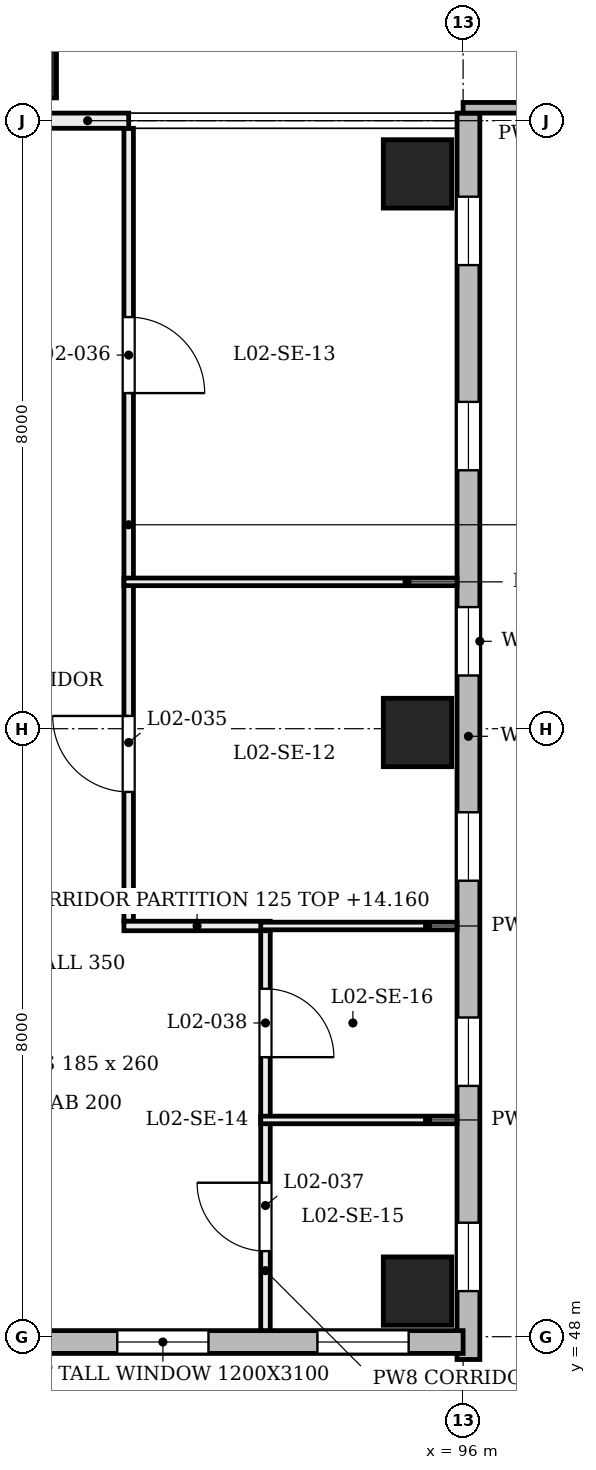
"""IFC4 building model, lengths in metres.
Left out: names, types, materials, properties, quantities, classifications, styles, units other than length and angle.
Written with IfcOpenShell. Run it as: python <this file> out.ifc"""

import sys

from ifc_helpers import new_model, si_unit, direction, frame, frame_2d, origin, origin_2d, place, context, subcontext, project, spatial, rectangle, extrude, element, fill, save


model = new_model("IFC4")
c1 = context("Model", 3, precision=1e-05, world=origin(), true_north=direction((0.0, 1.0)))
c2 = subcontext(c1, "Body", "Model", "MODEL_VIEW")
j1 = project(units=[si_unit("LENGTHUNIT", "METRE"), si_unit("PLANEANGLEUNIT", "RADIAN")], contexts=[c1])
p1 = place(None, origin())
s1 = spatial("IfcSite", under=j1, at=p1, CompositionType="ELEMENT")
p2 = place(p1, origin())
s2 = spatial("IfcBuilding", under=s1, at=p2, CompositionType="ELEMENT")
p3 = place(p2, frame((0.0, 0.0, 9.6)))
s3 = spatial("IfcBuildingStorey", under=s2, at=p3, CompositionType="ELEMENT", Elevation=9.6)
for number, where, z_axis, x_axis in (
    (1, (95.4, 48.6, 0.0), (0.0, 0.0, 1.0), (1.0, 0.0, 0.0)),
    (2, (95.4, 55.95, 0.0), (0.0, 0.0, 1.0), (1.0, 0.0, 0.0)),
    (3, (95.4, 63.3, 0.0), (0.0, 0.0, 1.0), (1.0, 0.0, 0.0)),
):
    element("IfcColumn", number, at=place(p3, frame(where, z_axis=z_axis, x_axis=x_axis)), inside=s3, PredefinedType="COLUMN", context=c2, shape_type="SweptSolid", body=[
        extrude(rectangle(XDim=0.9, YDim=0.9, at=origin_2d()), origin(), (0.0, 0.0, 1.0), 4.8),
    ])
p4 = place(p3, frame((90.0, 64.7, 0.0), z_axis=(0.203962208122, 0.0, 0.978978762618), x_axis=(0.0, 1.0, 0.0)))
e4 = element("IfcColumn", 4, at=p4, inside=s3, PredefinedType="COLUMN", context=c2, shape_type="SweptSolid", body=[
    extrude(rectangle(XDim=0.8, YDim=0.8, at=origin_2d()), origin(), (0.0, 0.0, 1.0), 4.903),
])
p5 = place(p3, frame((96.07, 47.7, 0.0), z_axis=(0.0, 0.0, 1.0), x_axis=(0.0, 1.0, 0.0)))
e5 = element("IfcWall", 5, at=p5, inside=s3, PredefinedType="SOLIDWALL", context=c2, shape_type="SweptSolid", body=[
    extrude(rectangle(XDim=16.4, YDim=0.3, at=frame_2d((8.2, 0.0))), origin(), (0.0, 0.0, 1.0), 3.9),
])
p6 = place(p5, frame((0.9, 0.0, 0.75)))
e6 = element("IfcOpeningElement", 6, at=p6, cuts=e5, PredefinedType="OPENING", context=c2, shape_type="SweptSolid", body=[
    extrude(rectangle(XDim=0.9, YDim=3.1, at=frame_2d((0.45, 1.55))), frame((0.0, 0.16, 0.0), z_axis=(0.0, -1.0, 0.0), x_axis=(1.0, 0.0, 0.0)), (0.0, 0.0, 1.0), 0.32),
])
p7 = place(p5, frame((3.6, 0.0, 0.75)))
e7 = element("IfcOpeningElement", 7, at=p7, cuts=e5, PredefinedType="OPENING", context=c2, shape_type="SweptSolid", body=[
    extrude(rectangle(XDim=0.9, YDim=3.1, at=frame_2d((0.45, 1.55))), frame((0.0, 0.16, 0.0), z_axis=(0.0, -1.0, 0.0), x_axis=(1.0, 0.0, 0.0)), (0.0, 0.0, 1.0), 0.32),
])
p8 = place(p5, frame((6.3, 0.0, 0.75)))
e8 = element("IfcOpeningElement", 8, at=p8, cuts=e5, PredefinedType="OPENING", context=c2, shape_type="SweptSolid", body=[
    extrude(rectangle(XDim=0.9, YDim=3.1, at=frame_2d((0.45, 1.55))), frame((0.0, 0.16, 0.0), z_axis=(0.0, -1.0, 0.0), x_axis=(1.0, 0.0, 0.0)), (0.0, 0.0, 1.0), 0.32),
])
p9 = place(p5, frame((9.0, 0.0, 0.75)))
e9 = element("IfcOpeningElement", 9, at=p9, cuts=e5, PredefinedType="OPENING", context=c2, shape_type="SweptSolid", body=[
    extrude(rectangle(XDim=0.9, YDim=3.1, at=frame_2d((0.45, 1.55))), frame((0.0, 0.16, 0.0), z_axis=(0.0, -1.0, 0.0), x_axis=(1.0, 0.0, 0.0)), (0.0, 0.0, 1.0), 0.32),
])
p10 = place(p5, frame((11.7, 0.0, 0.75)))
e10 = element("IfcOpeningElement", 10, at=p10, cuts=e5, PredefinedType="OPENING", context=c2, shape_type="SweptSolid", body=[
    extrude(rectangle(XDim=0.9, YDim=3.1, at=frame_2d((0.45, 1.55))), frame((0.0, 0.16, 0.0), z_axis=(0.0, -1.0, 0.0), x_axis=(1.0, 0.0, 0.0)), (0.0, 0.0, 1.0), 0.32),
])
p11 = place(p5, frame((14.4, 0.0, 0.75)))
e11 = element("IfcOpeningElement", 11, at=p11, cuts=e5, PredefinedType="OPENING", context=c2, shape_type="SweptSolid", body=[
    extrude(rectangle(XDim=0.9, YDim=3.1, at=frame_2d((0.45, 1.55))), frame((0.0, 0.16, 0.0), z_axis=(0.0, -1.0, 0.0), x_axis=(1.0, 0.0, 0.0)), (0.0, 0.0, 1.0), 0.32),
])
p12 = place(p3, frame((88.1, 47.93, 0.0), z_axis=(0.0, 0.0, 1.0), x_axis=(1.0, 0.0, 0.0)))
e12 = element("IfcWall", 12, at=p12, inside=s3, PredefinedType="SOLIDWALL", context=c2, shape_type="SweptSolid", body=[
    extrude(rectangle(XDim=7.9, YDim=0.3, at=frame_2d((3.95, 0.0))), origin(), (0.0, 0.0, 1.0), 3.9),
])
p13 = place(p12, frame((0.717, 0.0, 0.75)))
e13 = element("IfcOpeningElement", 13, at=p13, cuts=e12, PredefinedType="OPENING", context=c2, shape_type="SweptSolid", body=[
    extrude(rectangle(XDim=1.2, YDim=3.1, at=frame_2d((0.6, 1.55))), frame((0.0, 0.16, 0.0), z_axis=(0.0, -1.0, 0.0), x_axis=(1.0, 0.0, 0.0)), (0.0, 0.0, 1.0), 0.32),
])
p14 = place(p12, frame((3.35, 0.0, 0.75)))
e14 = element("IfcOpeningElement", 14, at=p14, cuts=e12, PredefinedType="OPENING", context=c2, shape_type="SweptSolid", body=[
    extrude(rectangle(XDim=1.2, YDim=3.1, at=frame_2d((0.6, 1.55))), frame((0.0, 0.16, 0.0), z_axis=(0.0, -1.0, 0.0), x_axis=(1.0, 0.0, 0.0)), (0.0, 0.0, 1.0), 0.32),
])
p15 = place(p12, frame((5.983, 0.0, 0.75)))
e15 = element("IfcOpeningElement", 15, at=p15, cuts=e12, PredefinedType="OPENING", context=c2, shape_type="SweptSolid", body=[
    extrude(rectangle(XDim=1.2, YDim=3.1, at=frame_2d((0.6, 1.55))), frame((0.0, 0.16, 0.0), z_axis=(0.0, -1.0, 0.0), x_axis=(1.0, 0.0, 0.0)), (0.0, 0.0, 1.0), 0.32),
])
p16 = place(p3, frame((96.0, 64.17, 0.0), z_axis=(0.0, 0.0, 1.0), x_axis=(1.0, 0.0, 0.0)))
e16 = element("IfcWall", 16, at=p16, inside=s3, PredefinedType="SOLIDWALL", context=c2, shape_type="SweptSolid", body=[
    extrude(rectangle(XDim=2.0, YDim=0.14, at=frame_2d((1.0, 0.0))), origin(), (0.0, 0.0, 1.0), 3.9),
])
p17 = place(p3, frame((91.6, 53.467, 0.0), z_axis=(0.0, 0.0, 1.0), x_axis=(0.0, 1.0, 0.0)))
e17 = element("IfcWall", 17, at=p17, inside=s3, PredefinedType="PARTITIONING", context=c2, shape_type="SweptSolid", body=[
    extrude(rectangle(XDim=10.433, YDim=0.125, at=frame_2d((5.217, 0.0))), origin(), (0.0, 0.0, 1.0), 3.88),
])
p18 = place(p17, frame((1.701, 0.0, 0.0)))
e18 = element("IfcOpeningElement", 18, at=p18, cuts=e17, PredefinedType="OPENING", context=c2, shape_type="SweptSolid", body=[
    extrude(rectangle(XDim=1.0, YDim=2.1, at=frame_2d((0.5, 1.05))), frame((0.0, 0.073, 0.0), z_axis=(0.0, -1.0, 0.0), x_axis=(1.0, 0.0, 0.0)), (0.0, 0.0, 1.0), 0.145),
])
p19 = place(p17, frame((6.949, 0.0, 0.0)))
e19 = element("IfcOpeningElement", 19, at=p19, cuts=e17, PredefinedType="OPENING", context=c2, shape_type="SweptSolid", body=[
    extrude(rectangle(XDim=1.0, YDim=2.1, at=frame_2d((0.5, 1.05))), frame((0.0, 0.073, 0.0), z_axis=(0.0, -1.0, 0.0), x_axis=(1.0, 0.0, 0.0)), (0.0, 0.0, 1.0), 0.145),
])
p20 = place(p3, frame((91.538, 53.404, 0.0), z_axis=(0.0, 0.0, 1.0), x_axis=(1.0, 0.0, 0.0)))
e20 = element("IfcWall", 20, at=p20, inside=s3, PredefinedType="PARTITIONING", context=c2, shape_type="SweptSolid", body=[
    extrude(rectangle(XDim=1.925, YDim=0.125, at=frame_2d((0.962, 0.0))), origin(), (0.0, 0.0, 1.0), 4.56),
])
p21 = place(p3, frame((93.337, 53.404, 0.0), z_axis=(0.0, 0.0, 1.0), x_axis=(1.0, 0.0, 0.0)))
e21 = element("IfcWall", 21, at=p21, inside=s3, PredefinedType="PARTITIONING", context=c2, shape_type="SweptSolid", body=[
    extrude(rectangle(XDim=2.583, YDim=0.1, at=frame_2d((1.291, 0.0))), origin(), (0.0, 0.0, 1.0), 3.88),
])
p22 = place(p3, frame((91.538, 57.932, 0.0), z_axis=(0.0, 0.0, 1.0), x_axis=(1.0, 0.0, 0.0)))
e22 = element("IfcWall", 22, at=p22, inside=s3, PredefinedType="PARTITIONING", context=c2, shape_type="SweptSolid", body=[
    extrude(rectangle(XDim=4.382, YDim=0.1, at=frame_2d((2.191, 0.0))), origin(), (0.0, 0.0, 1.0), 3.88),
])
p23 = place(p3, frame((93.4, 48.08, 0.0), z_axis=(0.0, 0.0, 1.0), x_axis=(0.0, 1.0, 0.0)))
e23 = element("IfcWall", 23, at=p23, inside=s3, PredefinedType="PARTITIONING", context=c2, shape_type="SweptSolid", body=[
    extrude(rectangle(XDim=5.261, YDim=0.125, at=frame_2d((2.631, 0.0))), origin(), (0.0, 0.0, 1.0), 3.88),
])
p24 = place(p23, frame((1.046, 0.0, 0.0)))
e24 = element("IfcOpeningElement", 24, at=p24, cuts=e23, PredefinedType="OPENING", context=c2, shape_type="SweptSolid", body=[
    extrude(rectangle(XDim=0.9, YDim=2.1, at=frame_2d((0.45, 1.05))), frame((0.0, 0.073, 0.0), z_axis=(0.0, -1.0, 0.0), x_axis=(1.0, 0.0, 0.0)), (0.0, 0.0, 1.0), 0.145),
])
p25 = place(p23, frame((3.598, 0.0, 0.0)))
e25 = element("IfcOpeningElement", 25, at=p25, cuts=e23, PredefinedType="OPENING", context=c2, shape_type="SweptSolid", body=[
    extrude(rectangle(XDim=0.9, YDim=2.1, at=frame_2d((0.45, 1.05))), frame((0.0, 0.073, 0.0), z_axis=(0.0, -1.0, 0.0), x_axis=(1.0, 0.0, 0.0)), (0.0, 0.0, 1.0), 0.145),
])
p26 = place(p3, frame((93.337, 50.852, 0.0), z_axis=(0.0, 0.0, 1.0), x_axis=(1.0, 0.0, 0.0)))
e26 = element("IfcWall", 26, at=p26, inside=s3, PredefinedType="PARTITIONING", context=c2, shape_type="SweptSolid", body=[
    extrude(rectangle(XDim=2.583, YDim=0.1, at=frame_2d((1.291, 0.0))), origin(), (0.0, 0.0, 1.0), 3.88),
])
p27 = place(p3, frame((88.0, 64.0, 0.0), z_axis=(0.0, 0.0, 1.0), x_axis=(1.0, 0.0, 0.0)))
e27 = element("IfcWall", 27, at=p27, inside=s3, PredefinedType="PARTITIONING", context=c2, shape_type="SweptSolid", body=[
    extrude(rectangle(XDim=3.6, YDim=0.2, at=frame_2d((1.8, 0.0))), origin(), (0.0, 0.0, 1.0), 3.88),
])
p28 = place(p27, frame((0.9, 0.0, 0.0)))
e28 = element("IfcOpeningElement", 28, at=p28, cuts=e27, PredefinedType="OPENING", context=c2, shape_type="SweptSolid", body=[
    extrude(rectangle(XDim=0.9, YDim=2.1, at=frame_2d((0.45, 1.05))), frame((0.0, 0.11, 0.0), z_axis=(0.0, -1.0, 0.0), x_axis=(1.0, 0.0, 0.0)), (0.0, 0.0, 1.0), 0.22),
])
p29 = place(p6, origin())
e29 = element("IfcWindow", 29, at=p29, inside=s3, PartitioningType="SINGLE_PANEL", PredefinedType="WINDOW", context=c2, shape_type="SweptSolid", body=[
    extrude(rectangle(XDim=0.9, YDim=3.1, at=frame_2d((0.45, 1.55))), frame((0.0, 0.03, 0.0), z_axis=(0.0, -1.0, 0.0), x_axis=(1.0, 0.0, 0.0)), (0.0, 0.0, 1.0), 0.06),
])
fill(e6, e29)
p30 = place(p7, origin())
e30 = element("IfcWindow", 30, at=p30, inside=s3, PartitioningType="SINGLE_PANEL", PredefinedType="WINDOW", context=c2, shape_type="SweptSolid", body=[
    extrude(rectangle(XDim=0.9, YDim=3.1, at=frame_2d((0.45, 1.55))), frame((0.0, 0.03, 0.0), z_axis=(0.0, -1.0, 0.0), x_axis=(1.0, 0.0, 0.0)), (0.0, 0.0, 1.0), 0.06),
])
fill(e7, e30)
p31 = place(p8, origin())
e31 = element("IfcWindow", 31, at=p31, inside=s3, PartitioningType="SINGLE_PANEL", PredefinedType="WINDOW", context=c2, shape_type="SweptSolid", body=[
    extrude(rectangle(XDim=0.9, YDim=3.1, at=frame_2d((0.45, 1.55))), frame((0.0, 0.03, 0.0), z_axis=(0.0, -1.0, 0.0), x_axis=(1.0, 0.0, 0.0)), (0.0, 0.0, 1.0), 0.06),
])
fill(e8, e31)
p32 = place(p9, origin())
e32 = element("IfcWindow", 32, at=p32, inside=s3, PartitioningType="SINGLE_PANEL", PredefinedType="WINDOW", context=c2, shape_type="SweptSolid", body=[
    extrude(rectangle(XDim=0.9, YDim=3.1, at=frame_2d((0.45, 1.55))), frame((0.0, 0.03, 0.0), z_axis=(0.0, -1.0, 0.0), x_axis=(1.0, 0.0, 0.0)), (0.0, 0.0, 1.0), 0.06),
])
fill(e9, e32)
p33 = place(p10, origin())
e33 = element("IfcWindow", 33, at=p33, inside=s3, PartitioningType="SINGLE_PANEL", PredefinedType="WINDOW", context=c2, shape_type="SweptSolid", body=[
    extrude(rectangle(XDim=0.9, YDim=3.1, at=frame_2d((0.45, 1.55))), frame((0.0, 0.03, 0.0), z_axis=(0.0, -1.0, 0.0), x_axis=(1.0, 0.0, 0.0)), (0.0, 0.0, 1.0), 0.06),
])
fill(e10, e33)
p34 = place(p11, origin())
e34 = element("IfcWindow", 34, at=p34, inside=s3, PartitioningType="SINGLE_PANEL", PredefinedType="WINDOW", context=c2, shape_type="SweptSolid", body=[
    extrude(rectangle(XDim=0.9, YDim=3.1, at=frame_2d((0.45, 1.55))), frame((0.0, 0.03, 0.0), z_axis=(0.0, -1.0, 0.0), x_axis=(1.0, 0.0, 0.0)), (0.0, 0.0, 1.0), 0.06),
])
fill(e11, e34)
p35 = place(p14, origin())
e35 = element("IfcWindow", 35, at=p35, inside=s3, PartitioningType="SINGLE_PANEL", PredefinedType="WINDOW", context=c2, shape_type="SweptSolid", body=[
    extrude(rectangle(XDim=1.2, YDim=3.1, at=frame_2d((0.6, 1.55))), frame((0.0, 0.03, 0.0), z_axis=(0.0, -1.0, 0.0), x_axis=(1.0, 0.0, 0.0)), (0.0, 0.0, 1.0), 0.06),
])
fill(e14, e35)
p36 = place(p15, origin())
e36 = element("IfcWindow", 36, at=p36, inside=s3, PartitioningType="SINGLE_PANEL", PredefinedType="WINDOW", context=c2, shape_type="SweptSolid", body=[
    extrude(rectangle(XDim=1.2, YDim=3.1, at=frame_2d((0.6, 1.55))), frame((0.0, 0.03, 0.0), z_axis=(0.0, -1.0, 0.0), x_axis=(1.0, 0.0, 0.0)), (0.0, 0.0, 1.0), 0.06),
])
fill(e15, e36)
p37 = place(p18, frame((1.0, 0.0, 0.0), z_axis=(0.0, 0.0, 1.0), x_axis=(-1.0, 0.0, 0.0)))
e37 = element("IfcDoor", 37, at=p37, inside=s3, OperationType="SINGLE_SWING_RIGHT", PredefinedType="DOOR", context=c2, shape_type="SweptSolid", body=[
    extrude(rectangle(XDim=1.0, YDim=2.1, at=frame_2d((0.5, 1.05))), frame((0.0, 0.025, 0.0), z_axis=(0.0, -1.0, 0.0), x_axis=(1.0, 0.0, 0.0)), (0.0, 0.0, 1.0), 0.05),
])
fill(e18, e37)
p38 = place(p19, frame((1.0, 0.0, 0.0), z_axis=(0.0, 0.0, 1.0), x_axis=(-1.0, 0.0, 0.0)))
e38 = element("IfcDoor", 38, at=p38, inside=s3, OperationType="SINGLE_SWING_LEFT", PredefinedType="DOOR", context=c2, shape_type="SweptSolid", body=[
    extrude(rectangle(XDim=1.0, YDim=2.1, at=frame_2d((0.5, 1.05))), frame((0.0, 0.025, 0.0), z_axis=(0.0, -1.0, 0.0), x_axis=(1.0, 0.0, 0.0)), (0.0, 0.0, 1.0), 0.05),
])
fill(e19, e38)
p39 = place(p24, frame((0.9, 0.0, 0.0), z_axis=(0.0, 0.0, 1.0), x_axis=(-1.0, 0.0, 0.0)))
e39 = element("IfcDoor", 39, at=p39, inside=s3, OperationType="SINGLE_SWING_RIGHT", PredefinedType="DOOR", context=c2, shape_type="SweptSolid", body=[
    extrude(rectangle(XDim=0.9, YDim=2.1, at=frame_2d((0.45, 1.05))), frame((0.0, 0.025, 0.0), z_axis=(0.0, -1.0, 0.0), x_axis=(1.0, 0.0, 0.0)), (0.0, 0.0, 1.0), 0.05),
])
fill(e24, e39)
p40 = place(p25, frame((0.9, 0.0, 0.0), z_axis=(0.0, 0.0, 1.0), x_axis=(-1.0, 0.0, 0.0)))
e40 = element("IfcDoor", 40, at=p40, inside=s3, OperationType="SINGLE_SWING_LEFT", PredefinedType="DOOR", context=c2, shape_type="SweptSolid", body=[
    extrude(rectangle(XDim=0.9, YDim=2.1, at=frame_2d((0.45, 1.05))), frame((0.0, 0.025, 0.0), z_axis=(0.0, -1.0, 0.0), x_axis=(1.0, 0.0, 0.0)), (0.0, 0.0, 1.0), 0.05),
])
fill(e25, e40)
save(model, sys.argv[1])
